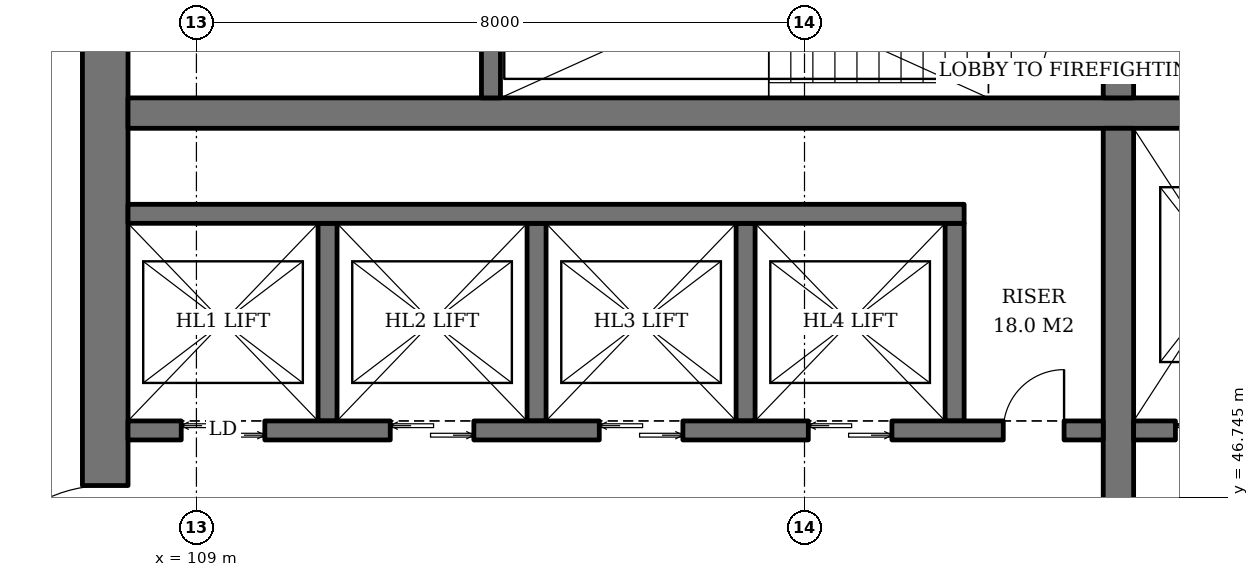
"""IFC4 building model, lengths in metres.
Left out: names, types, materials, properties, quantities, classifications, styles, units other than length and angle.
Written with IfcOpenShell. Run it as: python <this file> out.ifc"""

import sys

from ifc_helpers import new_model, si_unit, direction, frame, frame_2d, origin, place, context, subcontext, project, spatial, rectangle, extrude, element, fill, save


model = new_model("IFC4")
c1 = context("Model", 3, precision=1e-05, world=origin(), true_north=direction((0.0, 1.0)))
c2 = subcontext(c1, "Body", "Model", "MODEL_VIEW")
j1 = project(units=[si_unit("LENGTHUNIT", "METRE"), si_unit("PLANEANGLEUNIT", "RADIAN")], contexts=[c1])
p1 = place(None, origin())
s1 = spatial("IfcSite", under=j1, at=p1, CompositionType="ELEMENT")
p2 = place(p1, origin())
s2 = spatial("IfcBuilding", under=s1, at=p2, CompositionType="ELEMENT")
p3 = place(p2, frame((0.0, 0.0, 97.0)))
s3 = spatial("IfcBuildingStorey", under=s2, at=p3, CompositionType="ELEMENT", Elevation=97.0)
p4 = place(p3, frame((107.8, 37.1, 0.0), z_axis=(0.0, 0.0, 1.0), x_axis=(0.0, 1.0, 0.0)))
e1 = element("IfcWall", 1, at=p4, inside=s3, PredefinedType="SHEAR", context=c2, shape_type="SweptSolid", body=[
    extrude(rectangle(XDim=17.8, YDim=0.6, at=frame_2d((8.9, 0.0))), origin(), (0.0, 0.0, 1.0), 3.8),
])
p5 = place(p4, frame((8.0, 0.0, 0.0)))
e2 = element("IfcOpeningElement", 2, at=p5, cuts=e1, PredefinedType="OPENING", context=c2, shape_type="SweptSolid", body=[
    extrude(rectangle(XDim=1.8, YDim=2.4, at=frame_2d((0.9, 1.2))), frame((0.0, 0.31, 0.0), z_axis=(0.0, -1.0, 0.0), x_axis=(1.0, 0.0, 0.0)), (0.0, 0.0, 1.0), 0.62),
])
p6 = place(p3, frame((108.1, 51.8, 0.0), z_axis=(0.0, 0.0, 1.0), x_axis=(1.0, 0.0, 0.0)))
e3 = element("IfcWall", 3, at=p6, inside=s3, PredefinedType="SHEAR", context=c2, shape_type="SweptSolid", body=[
    extrude(rectangle(XDim=17.8, YDim=0.4, at=frame_2d((8.9, 0.0))), origin(), (0.0, 0.0, 1.0), 3.8),
])
p7 = place(p3, frame((121.13, 40.4, 0.0), z_axis=(0.0, 0.0, 1.0), x_axis=(0.0, 1.0, 0.0)))
e4 = element("IfcWall", 4, at=p7, inside=s3, PredefinedType="SHEAR", context=c2, shape_type="SweptSolid", body=[
    extrude(rectangle(XDim=11.2, YDim=0.4, at=frame_2d((5.6, 0.0))), origin(), (0.0, 0.0, 1.0), 3.8),
])
p8 = place(p3, frame((121.13, 52.0, 0.0), z_axis=(0.0, 0.0, 1.0), x_axis=(0.0, 1.0, 0.0)))
e5 = element("IfcWall", 5, at=p8, inside=s3, PredefinedType="SHEAR", context=c2, shape_type="SweptSolid", body=[
    extrude(rectangle(XDim=2.9, YDim=0.4, at=frame_2d((1.45, 0.0))), origin(), (0.0, 0.0, 1.0), 3.8),
])
p9 = place(p8, frame((0.3, 0.0, 0.0)))
e6 = element("IfcOpeningElement", 6, at=p9, cuts=e5, PredefinedType="OPENING", context=c2, shape_type="SweptSolid", body=[
    extrude(rectangle(XDim=1.0, YDim=2.1, at=frame_2d((0.5, 1.05))), frame((0.0, 0.21, 0.0), z_axis=(0.0, -1.0, 0.0), x_axis=(1.0, 0.0, 0.0)), (0.0, 0.0, 1.0), 0.42),
])
p10 = place(p3, frame((112.875, 52.0, 0.0), z_axis=(0.0, 0.0, 1.0), x_axis=(0.0, 1.0, 0.0)))
e7 = element("IfcWall", 7, at=p10, inside=s3, PredefinedType="SHEAR", context=c2, shape_type="SweptSolid", body=[
    extrude(rectangle(XDim=2.9, YDim=0.25, at=frame_2d((1.45, 0.0))), origin(), (0.0, 0.0, 1.0), 3.8),
])
for number, where, z_axis, x_axis in (
    (8, (110.725, 47.75, 0.0), (0.0, 0.0, 1.0), (0.0, 1.0, 0.0)),
    (9, (113.475, 47.75, 0.0), (0.0, 0.0, 1.0), (0.0, 1.0, 0.0)),
    (10, (116.225, 47.75, 0.0), (0.0, 0.0, 1.0), (0.0, 1.0, 0.0)),
    (11, (118.975, 47.75, 0.0), (0.0, 0.0, 1.0), (0.0, 1.0, 0.0)),
):
    element("IfcWall", number, at=place(p3, frame(where, z_axis=z_axis, x_axis=x_axis)), inside=s3, PredefinedType="SHEAR", context=c2, shape_type="SweptSolid", body=[
        extrude(rectangle(XDim=2.6, YDim=0.25, at=frame_2d((1.3, 0.0))), origin(), (0.0, 0.0, 1.0), 3.8),
    ])
p11 = place(p3, frame((108.1, 50.475, 0.0), z_axis=(0.0, 0.0, 1.0), x_axis=(1.0, 0.0, 0.0)))
e12 = element("IfcWall", 12, at=p11, inside=s3, PredefinedType="SHEAR", context=c2, shape_type="SweptSolid", body=[
    extrude(rectangle(XDim=11.0, YDim=0.25, at=frame_2d((5.5, 0.0))), origin(), (0.0, 0.0, 1.0), 3.8),
])
p12 = place(p3, frame((108.1, 47.625, 0.0), z_axis=(0.0, 0.0, 1.0), x_axis=(1.0, 0.0, 0.0)))
e13 = element("IfcWall", 13, at=p12, inside=s3, PredefinedType="SHEAR", context=c2, shape_type="SweptSolid", body=[
    extrude(rectangle(XDim=12.83, YDim=0.25, at=frame_2d((6.415, 0.0))), origin(), (0.0, 0.0, 1.0), 3.8),
])
p13 = place(p12, frame((0.7, 0.0, 0.0)))
e14 = element("IfcOpeningElement", 14, at=p13, cuts=e13, PredefinedType="OPENING", context=c2, shape_type="SweptSolid", body=[
    extrude(rectangle(XDim=1.1, YDim=2.2, at=frame_2d((0.55, 1.1))), frame((0.0, 0.135, 0.0), z_axis=(0.0, -1.0, 0.0), x_axis=(1.0, 0.0, 0.0)), (0.0, 0.0, 1.0), 0.27),
])
p14 = place(p12, frame((3.45, 0.0, 0.0)))
e15 = element("IfcOpeningElement", 15, at=p14, cuts=e13, PredefinedType="OPENING", context=c2, shape_type="SweptSolid", body=[
    extrude(rectangle(XDim=1.1, YDim=2.2, at=frame_2d((0.55, 1.1))), frame((0.0, 0.135, 0.0), z_axis=(0.0, -1.0, 0.0), x_axis=(1.0, 0.0, 0.0)), (0.0, 0.0, 1.0), 0.27),
])
p15 = place(p12, frame((6.2, 0.0, 0.0)))
e16 = element("IfcOpeningElement", 16, at=p15, cuts=e13, PredefinedType="OPENING", context=c2, shape_type="SweptSolid", body=[
    extrude(rectangle(XDim=1.1, YDim=2.2, at=frame_2d((0.55, 1.1))), frame((0.0, 0.135, 0.0), z_axis=(0.0, -1.0, 0.0), x_axis=(1.0, 0.0, 0.0)), (0.0, 0.0, 1.0), 0.27),
])
p16 = place(p12, frame((8.95, 0.0, 0.0)))
e17 = element("IfcOpeningElement", 17, at=p16, cuts=e13, PredefinedType="OPENING", context=c2, shape_type="SweptSolid", body=[
    extrude(rectangle(XDim=1.1, YDim=2.2, at=frame_2d((0.55, 1.1))), frame((0.0, 0.135, 0.0), z_axis=(0.0, -1.0, 0.0), x_axis=(1.0, 0.0, 0.0)), (0.0, 0.0, 1.0), 0.27),
])
p17 = place(p12, frame((11.515, 0.0, 0.0)))
e18 = element("IfcOpeningElement", 18, at=p17, cuts=e13, PredefinedType="OPENING", context=c2, shape_type="SweptSolid", body=[
    extrude(rectangle(XDim=0.8, YDim=2.0, at=frame_2d((0.4, 1.0))), frame((0.0, 0.135, 0.0), z_axis=(0.0, -1.0, 0.0), x_axis=(1.0, 0.0, 0.0)), (0.0, 0.0, 1.0), 0.27),
])
p18 = place(p3, frame((121.33, 47.625, 0.0), z_axis=(0.0, 0.0, 1.0), x_axis=(1.0, 0.0, 0.0)))
e19 = element("IfcWall", 19, at=p18, inside=s3, PredefinedType="SHEAR", context=c2, shape_type="SweptSolid", body=[
    extrude(rectangle(XDim=4.57, YDim=0.25, at=frame_2d((2.285, 0.0))), origin(), (0.0, 0.0, 1.0), 3.8),
])
p19 = place(p18, frame((0.55, 0.0, 0.0)))
e20 = element("IfcOpeningElement", 20, at=p19, cuts=e19, PredefinedType="OPENING", context=c2, shape_type="SweptSolid", body=[
    extrude(rectangle(XDim=1.4, YDim=2.4, at=frame_2d((0.7, 1.2))), frame((0.0, 0.135, 0.0), z_axis=(0.0, -1.0, 0.0), x_axis=(1.0, 0.0, 0.0)), (0.0, 0.0, 1.0), 0.27),
])
p20 = place(p18, frame((3.26, 0.0, 0.0)))
e21 = element("IfcOpeningElement", 21, at=p20, cuts=e19, PredefinedType="OPENING", context=c2, shape_type="SweptSolid", body=[
    extrude(rectangle(XDim=0.8, YDim=2.0, at=frame_2d((0.4, 1.0))), frame((0.0, 0.135, 0.0), z_axis=(0.0, -1.0, 0.0), x_axis=(1.0, 0.0, 0.0)), (0.0, 0.0, 1.0), 0.27),
])
p21 = place(p13, origin())
e22 = element("IfcDoor", 22, at=p21, inside=s3, OperationType="DOUBLE_DOOR_SLIDING", PredefinedType="DOOR", context=c2, shape_type="SweptSolid", body=[
    extrude(rectangle(XDim=1.1, YDim=2.2, at=frame_2d((0.55, 1.1))), frame((0.0, 0.025, 0.0), z_axis=(0.0, -1.0, 0.0), x_axis=(1.0, 0.0, 0.0)), (0.0, 0.0, 1.0), 0.05),
])
fill(e14, e22)
p22 = place(p14, origin())
e23 = element("IfcDoor", 23, at=p22, inside=s3, OperationType="DOUBLE_DOOR_SLIDING", PredefinedType="DOOR", context=c2, shape_type="SweptSolid", body=[
    extrude(rectangle(XDim=1.1, YDim=2.2, at=frame_2d((0.55, 1.1))), frame((0.0, 0.025, 0.0), z_axis=(0.0, -1.0, 0.0), x_axis=(1.0, 0.0, 0.0)), (0.0, 0.0, 1.0), 0.05),
])
fill(e15, e23)
p23 = place(p15, origin())
e24 = element("IfcDoor", 24, at=p23, inside=s3, OperationType="DOUBLE_DOOR_SLIDING", PredefinedType="DOOR", context=c2, shape_type="SweptSolid", body=[
    extrude(rectangle(XDim=1.1, YDim=2.2, at=frame_2d((0.55, 1.1))), frame((0.0, 0.025, 0.0), z_axis=(0.0, -1.0, 0.0), x_axis=(1.0, 0.0, 0.0)), (0.0, 0.0, 1.0), 0.05),
])
fill(e16, e24)
p24 = place(p16, origin())
e25 = element("IfcDoor", 25, at=p24, inside=s3, OperationType="DOUBLE_DOOR_SLIDING", PredefinedType="DOOR", context=c2, shape_type="SweptSolid", body=[
    extrude(rectangle(XDim=1.1, YDim=2.2, at=frame_2d((0.55, 1.1))), frame((0.0, 0.025, 0.0), z_axis=(0.0, -1.0, 0.0), x_axis=(1.0, 0.0, 0.0)), (0.0, 0.0, 1.0), 0.05),
])
fill(e17, e25)
p25 = place(p17, origin())
e26 = element("IfcDoor", 26, at=p25, inside=s3, OperationType="SINGLE_SWING_RIGHT", PredefinedType="DOOR", context=c2, shape_type="SweptSolid", body=[
    extrude(rectangle(XDim=0.8, YDim=2.0, at=frame_2d((0.4, 1.0))), frame((0.0, 0.025, 0.0), z_axis=(0.0, -1.0, 0.0), x_axis=(1.0, 0.0, 0.0)), (0.0, 0.0, 1.0), 0.05),
])
fill(e18, e26)
p26 = place(p19, origin())
e27 = element("IfcDoor", 27, at=p26, inside=s3, OperationType="DOUBLE_DOOR_SLIDING", PredefinedType="DOOR", context=c2, shape_type="SweptSolid", body=[
    extrude(rectangle(XDim=1.4, YDim=2.4, at=frame_2d((0.7, 1.2))), frame((0.0, 0.025, 0.0), z_axis=(0.0, -1.0, 0.0), x_axis=(1.0, 0.0, 0.0)), (0.0, 0.0, 1.0), 0.05),
])
fill(e20, e27)
p27 = place(p9, origin())
e28 = element("IfcDoor", 28, at=p27, inside=s3, OperationType="SINGLE_SWING_LEFT", PredefinedType="DOOR", context=c2, shape_type="SweptSolid", body=[
    extrude(rectangle(XDim=1.0, YDim=2.1, at=frame_2d((0.5, 1.05))), frame((0.0, 0.025, 0.0), z_axis=(0.0, -1.0, 0.0), x_axis=(1.0, 0.0, 0.0)), (0.0, 0.0, 1.0), 0.05),
])
fill(e6, e28)
p28 = place(p5, origin())
e29 = element("IfcDoor", 29, at=p28, inside=s3, OperationType="DOUBLE_DOOR_SINGLE_SWING", PredefinedType="DOOR", context=c2, shape_type="SweptSolid", body=[
    extrude(rectangle(XDim=1.8, YDim=2.4, at=frame_2d((0.9, 1.2))), frame((0.0, 0.025, 0.0), z_axis=(0.0, -1.0, 0.0), x_axis=(1.0, 0.0, 0.0)), (0.0, 0.0, 1.0), 0.05),
])
fill(e2, e29)
save(model, sys.argv[1])
